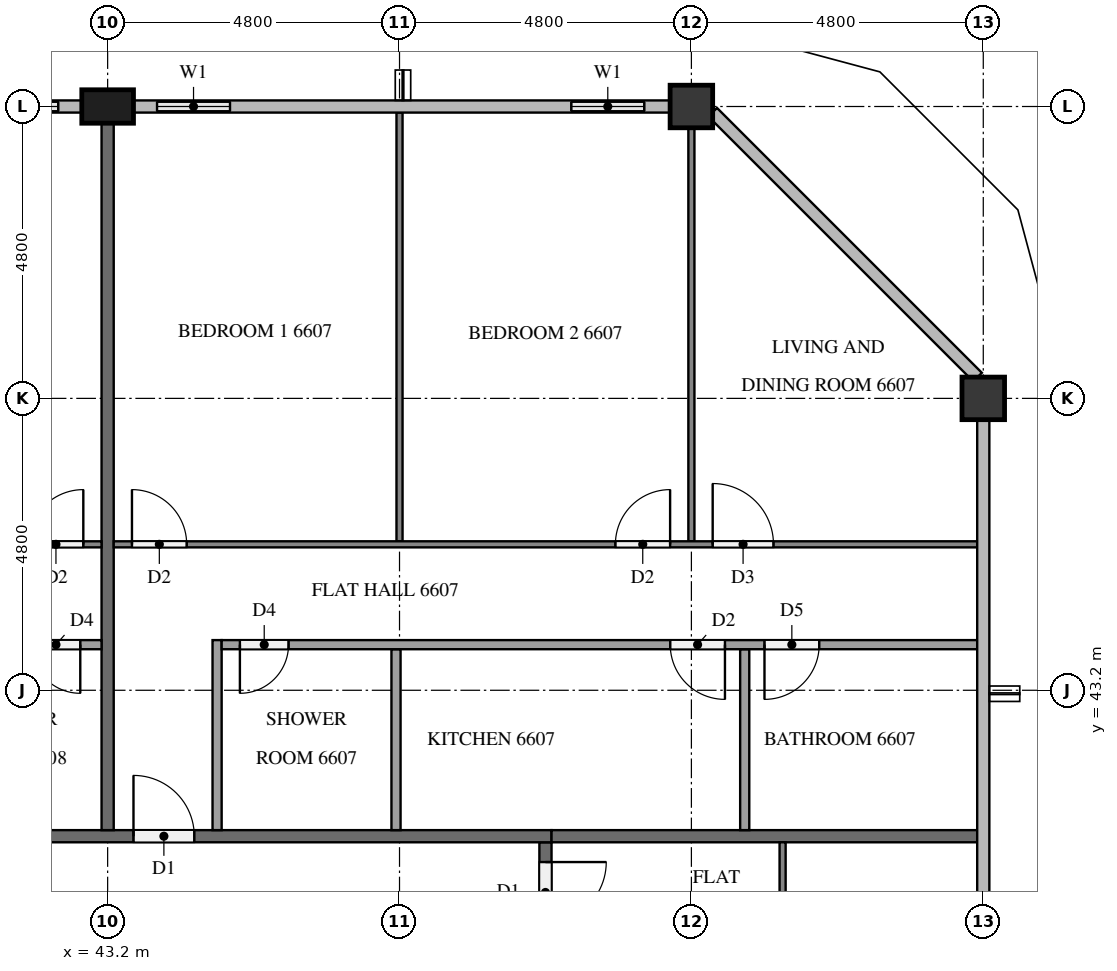
"""IFC4 building model, lengths in metres.
Left out: names, types, materials, properties, quantities, classifications, styles, units other than length and angle.
Written with IfcOpenShell. Run it as: python <this file> out.ifc"""

import sys

from ifc_helpers import new_model, si_unit, direction, frame, frame_2d, origin, origin_2d, place, context, subcontext, project, spatial, rectangle, extrude, element, fill, save


model = new_model("IFC4")
c1 = context("Model", 3, precision=1e-05, world=origin(), true_north=direction((0.0, 1.0)))
c2 = subcontext(c1, "Body", "Model", "MODEL_VIEW")
j1 = project(units=[si_unit("LENGTHUNIT", "METRE"), si_unit("PLANEANGLEUNIT", "RADIAN")], contexts=[c1])
p1 = place(None, origin())
s1 = spatial("IfcSite", under=j1, at=p1, CompositionType="ELEMENT")
p2 = place(p1, origin())
s2 = spatial("IfcBuilding", under=s1, at=p2, CompositionType="ELEMENT")
p3 = place(p2, frame((0.0, 0.0, 252.7)))
s3 = spatial("IfcBuildingStorey", under=s2, at=p3, CompositionType="ELEMENT", Elevation=252.7)
for number, where, z_axis, x_axis in (
    (1, (57.6, 48.0, 0.0), (0.0, 0.0, 1.0), (1.0, 0.0, 0.0)),
    (2, (52.8, 52.8, 0.0), (0.0, 0.0, 1.0), (1.0, 0.0, 0.0)),
):
    element("IfcColumn", number, at=place(p3, frame(where, z_axis=z_axis, x_axis=x_axis)), inside=s3, PredefinedType="COLUMN", context=c2, shape_type="SweptSolid", body=[
        extrude(rectangle(XDim=0.7, YDim=0.7, at=origin_2d()), origin(), (0.0, 0.0, 1.0), 3.2),
    ])
p4 = place(p3, frame((43.2, 52.8, 0.0), z_axis=(0.0, 0.0, 1.0), x_axis=(1.0, 0.0, 0.0)))
e3 = element("IfcColumn", 3, at=p4, inside=s3, PredefinedType="COLUMN", context=c2, shape_type="SweptSolid", body=[
    extrude(rectangle(XDim=0.85, YDim=0.55, at=origin_2d()), origin(), (0.0, 0.0, 1.0), 3.2),
])
p5 = place(p3, frame((52.45, 52.8, 0.0), z_axis=(0.0, 0.0, 1.0), x_axis=(-1.0, 0.0, 0.0)))
e4 = element("IfcWall", 4, at=p5, inside=s3, PredefinedType="SOLIDWALL", context=c2, shape_type="SweptSolid", body=[
    extrude(rectangle(XDim=2.05, YDim=0.15, at=frame_2d((1.025, 0.0))), origin(), (0.0, 0.0, 1.0), 3.2),
])
p6 = place(p5, frame((0.425, 0.0, 0.9)))
e5 = element("IfcOpeningElement", 5, at=p6, cuts=e4, PredefinedType="OPENING", context=c2, shape_type="SweptSolid", body=[
    extrude(rectangle(XDim=1.2, YDim=1.4, at=frame_2d((0.6, 0.7))), frame((0.0, 0.085, 0.0), z_axis=(0.0, -1.0, 0.0), x_axis=(1.0, 0.0, 0.0)), (0.0, 0.0, 1.0), 0.17),
])
p7 = place(p3, frame((45.6, 52.8, 0.0), z_axis=(0.0, 0.0, 1.0), x_axis=(-1.0, 0.0, 0.0)))
e6 = element("IfcWall", 6, at=p7, inside=s3, PredefinedType="SOLIDWALL", context=c2, shape_type="SweptSolid", body=[
    extrude(rectangle(XDim=1.975, YDim=0.15, at=frame_2d((0.988, 0.0))), origin(), (0.0, 0.0, 1.0), 3.2),
])
p8 = place(p7, frame((0.387, 0.0, 0.9)))
e7 = element("IfcOpeningElement", 7, at=p8, cuts=e6, PredefinedType="OPENING", context=c2, shape_type="SweptSolid", body=[
    extrude(rectangle(XDim=1.2, YDim=1.4, at=frame_2d((0.6, 0.7))), frame((0.0, 0.085, 0.0), z_axis=(0.0, -1.0, 0.0), x_axis=(1.0, 0.0, 0.0)), (0.0, 0.0, 1.0), 0.17),
])
p9 = place(p3, frame((42.775, 52.8, 0.0), z_axis=(0.0, 0.0, 1.0), x_axis=(-1.0, 0.0, 0.0)))
e8 = element("IfcWall", 8, at=p9, inside=s3, PredefinedType="SOLIDWALL", context=c2, shape_type="SweptSolid", body=[
    extrude(rectangle(XDim=1.975, YDim=0.15, at=frame_2d((0.987, 0.0))), origin(), (0.0, 0.0, 1.0), 3.2),
])
p10 = place(p9, frame((0.387, 0.0, 0.9)))
e9 = element("IfcOpeningElement", 9, at=p10, cuts=e8, PredefinedType="OPENING", context=c2, shape_type="SweptSolid", body=[
    extrude(rectangle(XDim=1.2, YDim=1.4, at=frame_2d((0.6, 0.7))), frame((0.0, 0.085, 0.0), z_axis=(0.0, -1.0, 0.0), x_axis=(1.0, 0.0, 0.0)), (0.0, 0.0, 1.0), 0.17),
])
p11 = place(p3, frame((50.4, 40.7, 0.0), z_axis=(0.0, 0.0, 1.0), x_axis=(0.0, -1.0, 0.0)))
e10 = element("IfcWall", 10, at=p11, inside=s3, PredefinedType="PARTITIONING", context=c2, shape_type="SweptSolid", body=[
    extrude(rectangle(XDim=28.6, YDim=0.2, at=frame_2d((14.3, 0.0))), origin(), (0.0, 0.0, 1.0), 3.2),
])
p12 = place(p11, frame((19.525, 0.0, 0.0)))
e11 = element("IfcOpeningElement", 11, at=p12, cuts=e10, PredefinedType="OPENING", context=c2, shape_type="SweptSolid", body=[
    extrude(rectangle(XDim=1.0, YDim=2.1, at=frame_2d((0.5, 1.05))), frame((0.0, 0.11, 0.0), z_axis=(0.0, -1.0, 0.0), x_axis=(1.0, 0.0, 0.0)), (0.0, 0.0, 1.0), 0.22),
])
p13 = place(p11, frame((17.675, 0.0, 0.0)))
e12 = element("IfcOpeningElement", 12, at=p13, cuts=e10, PredefinedType="OPENING", context=c2, shape_type="SweptSolid", body=[
    extrude(rectangle(XDim=1.0, YDim=2.1, at=frame_2d((0.5, 1.05))), frame((0.0, 0.11, 0.0), z_axis=(0.0, -1.0, 0.0), x_axis=(1.0, 0.0, 0.0)), (0.0, 0.0, 1.0), 0.22),
])
p14 = place(p11, frame((0.325, 0.0, 0.0)))
e13 = element("IfcOpeningElement", 13, at=p14, cuts=e10, PredefinedType="OPENING", context=c2, shape_type="SweptSolid", body=[
    extrude(rectangle(XDim=1.0, YDim=2.1, at=frame_2d((0.5, 1.05))), frame((0.0, 0.11, 0.0), z_axis=(0.0, -1.0, 0.0), x_axis=(1.0, 0.0, 0.0)), (0.0, 0.0, 1.0), 0.22),
])
p15 = place(p3, frame((11.9, 40.8, 0.0), z_axis=(0.0, 0.0, 1.0), x_axis=(1.0, 0.0, 0.0)))
e14 = element("IfcWall", 14, at=p15, inside=s3, PredefinedType="PARTITIONING", context=c2, shape_type="SweptSolid", body=[
    extrude(rectangle(XDim=38.6, YDim=0.2, at=frame_2d((19.3, 0.0))), origin(), (0.0, 0.0, 1.0), 3.2),
])
p16 = place(p15, frame((31.725, 0.0, 0.0)))
e15 = element("IfcOpeningElement", 15, at=p16, cuts=e14, PredefinedType="OPENING", context=c2, shape_type="SweptSolid", body=[
    extrude(rectangle(XDim=1.0, YDim=2.1, at=frame_2d((0.5, 1.05))), frame((0.0, 0.11, 0.0), z_axis=(0.0, -1.0, 0.0), x_axis=(1.0, 0.0, 0.0)), (0.0, 0.0, 1.0), 0.22),
])
p17 = place(p15, frame((17.325, 0.0, 0.0)))
e16 = element("IfcOpeningElement", 16, at=p17, cuts=e14, PredefinedType="OPENING", context=c2, shape_type="SweptSolid", body=[
    extrude(rectangle(XDim=1.0, YDim=2.1, at=frame_2d((0.5, 1.05))), frame((0.0, 0.11, 0.0), z_axis=(0.0, -1.0, 0.0), x_axis=(1.0, 0.0, 0.0)), (0.0, 0.0, 1.0), 0.22),
])
p18 = place(p15, frame((0.525, 0.0, 0.0)))
e17 = element("IfcOpeningElement", 17, at=p18, cuts=e14, PredefinedType="OPENING", context=c2, shape_type="SweptSolid", body=[
    extrude(rectangle(XDim=1.0, YDim=2.1, at=frame_2d((0.5, 1.05))), frame((0.0, 0.11, 0.0), z_axis=(0.0, -1.0, 0.0), x_axis=(1.0, 0.0, 0.0)), (0.0, 0.0, 1.0), 0.22),
])
p19 = place(p3, frame((50.5, 40.8, 0.0), z_axis=(0.0, 0.0, 1.0), x_axis=(1.0, 0.0, 0.0)))
e18 = element("IfcWall", 18, at=p19, inside=s3, PredefinedType="PARTITIONING", context=c2, shape_type="SweptSolid", body=[
    extrude(rectangle(XDim=7.0, YDim=0.2, at=frame_2d((3.5, 0.0))), origin(), (0.0, 0.0, 1.0), 3.2),
])
p20 = place(p3, frame((43.2, 52.525, 0.0), z_axis=(0.0, 0.0, 1.0), x_axis=(0.0, -1.0, 0.0)))
e19 = element("IfcWall", 19, at=p20, inside=s3, PredefinedType="PARTITIONING", context=c2, shape_type="SweptSolid", body=[
    extrude(rectangle(XDim=11.625, YDim=0.2, at=frame_2d((5.812, 0.0))), origin(), (0.0, 0.0, 1.0), 3.2),
])
p21 = place(p3, frame((54.3, 40.7, 0.0), z_axis=(0.0, 0.0, 1.0), x_axis=(0.0, -1.0, 0.0)))
e20 = element("IfcWall", 20, at=p21, inside=s3, PredefinedType="PARTITIONING", context=c2, shape_type="SweptSolid", body=[
    extrude(rectangle(XDim=9.4, YDim=0.1, at=frame_2d((4.7, 0.0))), origin(), (0.0, 0.0, 1.0), 3.2),
])
p22 = place(p21, frame((3.45, 0.0, 0.0)))
e21 = element("IfcOpeningElement", 21, at=p22, cuts=e20, PredefinedType="OPENING", context=c2, shape_type="SweptSolid", body=[
    extrude(rectangle(XDim=0.9, YDim=2.1, at=frame_2d((0.45, 1.05))), frame((0.0, 0.06, 0.0), z_axis=(0.0, -1.0, 0.0), x_axis=(1.0, 0.0, 0.0)), (0.0, 0.0, 1.0), 0.12),
])
p23 = place(p21, frame((5.05, 0.0, 0.0)))
e22 = element("IfcOpeningElement", 22, at=p23, cuts=e20, PredefinedType="OPENING", context=c2, shape_type="SweptSolid", body=[
    extrude(rectangle(XDim=1.0, YDim=2.1, at=frame_2d((0.5, 1.05))), frame((0.0, 0.06, 0.0), z_axis=(0.0, -1.0, 0.0), x_axis=(1.0, 0.0, 0.0)), (0.0, 0.0, 1.0), 0.12),
])
p24 = place(p3, frame((48.0, 45.65, 0.0), z_axis=(0.0, 0.0, 1.0), x_axis=(0.0, 1.0, 0.0)))
e23 = element("IfcWall", 23, at=p24, inside=s3, PredefinedType="PARTITIONING", context=c2, shape_type="SweptSolid", body=[
    extrude(rectangle(XDim=7.05, YDim=0.1, at=frame_2d((3.525, 0.0))), origin(), (0.0, 0.0, 1.0), 3.2),
])
p25 = place(p3, frame((52.8, 45.65, 0.0), z_axis=(0.0, 0.0, 1.0), x_axis=(0.0, 1.0, 0.0)))
e24 = element("IfcWall", 24, at=p25, inside=s3, PredefinedType="PARTITIONING", context=c2, shape_type="SweptSolid", body=[
    extrude(rectangle(XDim=6.8, YDim=0.1, at=frame_2d((3.4, 0.0))), origin(), (0.0, 0.0, 1.0), 3.2),
])
p26 = place(p3, frame((43.3, 45.6, 0.0), z_axis=(0.0, 0.0, 1.0), x_axis=(1.0, 0.0, 0.0)))
e25 = element("IfcWall", 25, at=p26, inside=s3, PredefinedType="PARTITIONING", context=c2, shape_type="SweptSolid", body=[
    extrude(rectangle(XDim=14.2, YDim=0.1, at=frame_2d((7.1, 0.0))), origin(), (0.0, 0.0, 1.0), 3.2),
])
p27 = place(p26, frame((0.3, 0.0, 0.0)))
e26 = element("IfcOpeningElement", 26, at=p27, cuts=e25, PredefinedType="OPENING", context=c2, shape_type="SweptSolid", body=[
    extrude(rectangle(XDim=0.9, YDim=2.1, at=frame_2d((0.45, 1.05))), frame((0.0, 0.06, 0.0), z_axis=(0.0, -1.0, 0.0), x_axis=(1.0, 0.0, 0.0)), (0.0, 0.0, 1.0), 0.12),
])
p28 = place(p26, frame((8.25, 0.0, 0.0)))
e27 = element("IfcOpeningElement", 27, at=p28, cuts=e25, PredefinedType="OPENING", context=c2, shape_type="SweptSolid", body=[
    extrude(rectangle(XDim=0.9, YDim=2.1, at=frame_2d((0.45, 1.05))), frame((0.0, 0.06, 0.0), z_axis=(0.0, -1.0, 0.0), x_axis=(1.0, 0.0, 0.0)), (0.0, 0.0, 1.0), 0.12),
])
p29 = place(p26, frame((9.85, 0.0, 0.0)))
e28 = element("IfcOpeningElement", 28, at=p29, cuts=e25, PredefinedType="OPENING", context=c2, shape_type="SweptSolid", body=[
    extrude(rectangle(XDim=1.0, YDim=2.1, at=frame_2d((0.5, 1.05))), frame((0.0, 0.06, 0.0), z_axis=(0.0, -1.0, 0.0), x_axis=(1.0, 0.0, 0.0)), (0.0, 0.0, 1.0), 0.12),
])
for number, where, z_axis, x_axis in (
    (29, (47.942, 40.9, 0.0), (0.0, 0.0, 1.0), (0.0, 1.0, 0.0)),
    (30, (53.677, 40.9, 0.0), (0.0, 0.0, 1.0), (0.0, 1.0, 0.0)),
):
    element("IfcWall", number, at=place(p3, frame(where, z_axis=z_axis, x_axis=x_axis)), inside=s3, PredefinedType="PARTITIONING", context=c2, shape_type="SweptSolid", body=[
        extrude(rectangle(XDim=2.975, YDim=0.15, at=frame_2d((1.488, 0.0))), origin(), (0.0, 0.0, 1.0), 3.2),
    ])
p30 = place(p3, frame((45.0, 40.9, 0.0), z_axis=(0.0, 0.0, 1.0), x_axis=(0.0, 1.0, 0.0)))
e31 = element("IfcWall", 31, at=p30, inside=s3, PredefinedType="PARTITIONING", context=c2, shape_type="SweptSolid", body=[
    extrude(rectangle(XDim=3.125, YDim=0.15, at=frame_2d((1.562, 0.0))), origin(), (0.0, 0.0, 1.0), 3.2),
])
p31 = place(p3, frame((57.5, 43.95, 0.0), z_axis=(0.0, 0.0, 1.0), x_axis=(-1.0, 0.0, 0.0)))
e32 = element("IfcWall", 32, at=p31, inside=s3, PredefinedType="PARTITIONING", context=c2, shape_type="SweptSolid", body=[
    extrude(rectangle(XDim=12.425, YDim=0.15, at=frame_2d((6.212, 0.0))), origin(), (0.0, 0.0, 1.0), 3.2),
])
p32 = place(p31, frame((11.325, 0.0, 0.0)))
e33 = element("IfcOpeningElement", 33, at=p32, cuts=e32, PredefinedType="OPENING", context=c2, shape_type="SweptSolid", body=[
    extrude(rectangle(XDim=0.8, YDim=2.1, at=frame_2d((0.4, 1.05))), frame((0.0, 0.085, 0.0), z_axis=(0.0, -1.0, 0.0), x_axis=(1.0, 0.0, 0.0)), (0.0, 0.0, 1.0), 0.17),
])
p33 = place(p31, frame((4.148, 0.0, 0.0)))
e34 = element("IfcOpeningElement", 34, at=p33, cuts=e32, PredefinedType="OPENING", context=c2, shape_type="SweptSolid", body=[
    extrude(rectangle(XDim=0.9, YDim=2.1, at=frame_2d((0.45, 1.05))), frame((0.0, 0.085, 0.0), z_axis=(0.0, -1.0, 0.0), x_axis=(1.0, 0.0, 0.0)), (0.0, 0.0, 1.0), 0.17),
])
p34 = place(p31, frame((2.598, 0.0, 0.0)))
e35 = element("IfcOpeningElement", 35, at=p34, cuts=e32, PredefinedType="OPENING", context=c2, shape_type="SweptSolid", body=[
    extrude(rectangle(XDim=0.9, YDim=2.1, at=frame_2d((0.45, 1.05))), frame((0.0, 0.085, 0.0), z_axis=(0.0, -1.0, 0.0), x_axis=(1.0, 0.0, 0.0)), (0.0, 0.0, 1.0), 0.17),
])
p35 = place(p3, frame((28.9, 45.6, 0.0), z_axis=(0.0, 0.0, 1.0), x_axis=(1.0, 0.0, 0.0)))
e36 = element("IfcWall", 36, at=p35, inside=s3, PredefinedType="PARTITIONING", context=c2, shape_type="SweptSolid", body=[
    extrude(rectangle(XDim=14.2, YDim=0.1, at=frame_2d((7.1, 0.0))), origin(), (0.0, 0.0, 1.0), 3.2),
])
p36 = place(p35, frame((3.35, 0.0, 0.0)))
e37 = element("IfcOpeningElement", 37, at=p36, cuts=e36, PredefinedType="OPENING", context=c2, shape_type="SweptSolid", body=[
    extrude(rectangle(XDim=1.0, YDim=2.1, at=frame_2d((0.5, 1.05))), frame((0.0, 0.06, 0.0), z_axis=(0.0, -1.0, 0.0), x_axis=(1.0, 0.0, 0.0)), (0.0, 0.0, 1.0), 0.12),
])
p37 = place(p35, frame((5.05, 0.0, 0.0)))
e38 = element("IfcOpeningElement", 38, at=p37, cuts=e36, PredefinedType="OPENING", context=c2, shape_type="SweptSolid", body=[
    extrude(rectangle(XDim=0.9, YDim=2.1, at=frame_2d((0.45, 1.05))), frame((0.0, 0.06, 0.0), z_axis=(0.0, -1.0, 0.0), x_axis=(1.0, 0.0, 0.0)), (0.0, 0.0, 1.0), 0.12),
])
p38 = place(p35, frame((13.0, 0.0, 0.0)))
e39 = element("IfcOpeningElement", 39, at=p38, cuts=e36, PredefinedType="OPENING", context=c2, shape_type="SweptSolid", body=[
    extrude(rectangle(XDim=0.9, YDim=2.1, at=frame_2d((0.45, 1.05))), frame((0.0, 0.06, 0.0), z_axis=(0.0, -1.0, 0.0), x_axis=(1.0, 0.0, 0.0)), (0.0, 0.0, 1.0), 0.12),
])
p39 = place(p3, frame((43.1, 43.95, 0.0), z_axis=(0.0, 0.0, 1.0), x_axis=(-1.0, 0.0, 0.0)))
e40 = element("IfcWall", 40, at=p39, inside=s3, PredefinedType="PARTITIONING", context=c2, shape_type="SweptSolid", body=[
    extrude(rectangle(XDim=12.425, YDim=0.15, at=frame_2d((6.212, 0.0))), origin(), (0.0, 0.0, 1.0), 3.2),
])
p40 = place(p39, frame((7.015, 0.0, 0.0)))
e41 = element("IfcOpeningElement", 41, at=p40, cuts=e40, PredefinedType="OPENING", context=c2, shape_type="SweptSolid", body=[
    extrude(rectangle(XDim=0.9, YDim=2.1, at=frame_2d((0.45, 1.05))), frame((0.0, 0.085, 0.0), z_axis=(0.0, -1.0, 0.0), x_axis=(1.0, 0.0, 0.0)), (0.0, 0.0, 1.0), 0.17),
])
p41 = place(p39, frame((5.465, 0.0, 0.0)))
e42 = element("IfcOpeningElement", 42, at=p41, cuts=e40, PredefinedType="OPENING", context=c2, shape_type="SweptSolid", body=[
    extrude(rectangle(XDim=0.9, YDim=2.1, at=frame_2d((0.45, 1.05))), frame((0.0, 0.085, 0.0), z_axis=(0.0, -1.0, 0.0), x_axis=(1.0, 0.0, 0.0)), (0.0, 0.0, 1.0), 0.17),
])
p42 = place(p39, frame((0.35, 0.0, 0.0)))
e43 = element("IfcOpeningElement", 43, at=p42, cuts=e40, PredefinedType="OPENING", context=c2, shape_type="SweptSolid", body=[
    extrude(rectangle(XDim=0.8, YDim=2.1, at=frame_2d((0.4, 1.05))), frame((0.0, 0.085, 0.0), z_axis=(0.0, -1.0, 0.0), x_axis=(1.0, 0.0, 0.0)), (0.0, 0.0, 1.0), 0.17),
])
p43 = place(p6, origin())
e44 = element("IfcWindow", 44, at=p43, inside=s3, PartitioningType="SINGLE_PANEL", PredefinedType="WINDOW", context=c2, shape_type="SweptSolid", body=[
    extrude(rectangle(XDim=1.2, YDim=1.4, at=frame_2d((0.6, 0.7))), frame((0.0, 0.03, 0.0), z_axis=(0.0, -1.0, 0.0), x_axis=(1.0, 0.0, 0.0)), (0.0, 0.0, 1.0), 0.06),
])
fill(e5, e44)
p44 = place(p8, origin())
e45 = element("IfcWindow", 45, at=p44, inside=s3, PartitioningType="SINGLE_PANEL", PredefinedType="WINDOW", context=c2, shape_type="SweptSolid", body=[
    extrude(rectangle(XDim=1.2, YDim=1.4, at=frame_2d((0.6, 0.7))), frame((0.0, 0.03, 0.0), z_axis=(0.0, -1.0, 0.0), x_axis=(1.0, 0.0, 0.0)), (0.0, 0.0, 1.0), 0.06),
])
fill(e7, e45)
p45 = place(p10, origin())
e46 = element("IfcWindow", 46, at=p45, inside=s3, PartitioningType="SINGLE_PANEL", PredefinedType="WINDOW", context=c2, shape_type="SweptSolid", body=[
    extrude(rectangle(XDim=1.2, YDim=1.4, at=frame_2d((0.6, 0.7))), frame((0.0, 0.03, 0.0), z_axis=(0.0, -1.0, 0.0), x_axis=(1.0, 0.0, 0.0)), (0.0, 0.0, 1.0), 0.06),
])
fill(e9, e46)
p46 = place(p14, origin())
e47 = element("IfcDoor", 47, at=p46, inside=s3, OperationType="SINGLE_SWING_LEFT", PredefinedType="DOOR", context=c2, shape_type="SweptSolid", body=[
    extrude(rectangle(XDim=1.0, YDim=2.1, at=frame_2d((0.5, 1.05))), frame((0.0, 0.025, 0.0), z_axis=(0.0, -1.0, 0.0), x_axis=(1.0, 0.0, 0.0)), (0.0, 0.0, 1.0), 0.05),
])
fill(e13, e47)
p47 = place(p16, origin())
e48 = element("IfcDoor", 48, at=p47, inside=s3, OperationType="SINGLE_SWING_LEFT", PredefinedType="DOOR", context=c2, shape_type="SweptSolid", body=[
    extrude(rectangle(XDim=1.0, YDim=2.1, at=frame_2d((0.5, 1.05))), frame((0.0, 0.025, 0.0), z_axis=(0.0, -1.0, 0.0), x_axis=(1.0, 0.0, 0.0)), (0.0, 0.0, 1.0), 0.05),
])
fill(e15, e48)
p48 = place(p27, origin())
e49 = element("IfcDoor", 49, at=p48, inside=s3, OperationType="SINGLE_SWING_LEFT", PredefinedType="DOOR", context=c2, shape_type="SweptSolid", body=[
    extrude(rectangle(XDim=0.9, YDim=2.1, at=frame_2d((0.45, 1.05))), frame((0.0, 0.025, 0.0), z_axis=(0.0, -1.0, 0.0), x_axis=(1.0, 0.0, 0.0)), (0.0, 0.0, 1.0), 0.05),
])
fill(e26, e49)
p49 = place(p28, origin())
e50 = element("IfcDoor", 50, at=p49, inside=s3, OperationType="SINGLE_SWING_RIGHT", PredefinedType="DOOR", context=c2, shape_type="SweptSolid", body=[
    extrude(rectangle(XDim=0.9, YDim=2.1, at=frame_2d((0.45, 1.05))), frame((0.0, 0.025, 0.0), z_axis=(0.0, -1.0, 0.0), x_axis=(1.0, 0.0, 0.0)), (0.0, 0.0, 1.0), 0.05),
])
fill(e27, e50)
p50 = place(p29, origin())
e51 = element("IfcDoor", 51, at=p50, inside=s3, OperationType="SINGLE_SWING_LEFT", PredefinedType="DOOR", context=c2, shape_type="SweptSolid", body=[
    extrude(rectangle(XDim=1.0, YDim=2.1, at=frame_2d((0.5, 1.05))), frame((0.0, 0.025, 0.0), z_axis=(0.0, -1.0, 0.0), x_axis=(1.0, 0.0, 0.0)), (0.0, 0.0, 1.0), 0.05),
])
fill(e28, e51)
p51 = place(p32, origin())
e52 = element("IfcDoor", 52, at=p51, inside=s3, OperationType="SINGLE_SWING_RIGHT", PredefinedType="DOOR", context=c2, shape_type="SweptSolid", body=[
    extrude(rectangle(XDim=0.8, YDim=2.1, at=frame_2d((0.4, 1.05))), frame((0.0, 0.025, 0.0), z_axis=(0.0, -1.0, 0.0), x_axis=(1.0, 0.0, 0.0)), (0.0, 0.0, 1.0), 0.05),
])
fill(e33, e52)
p52 = place(p33, origin())
e53 = element("IfcDoor", 53, at=p52, inside=s3, OperationType="SINGLE_SWING_LEFT", PredefinedType="DOOR", context=c2, shape_type="SweptSolid", body=[
    extrude(rectangle(XDim=0.9, YDim=2.1, at=frame_2d((0.45, 1.05))), frame((0.0, 0.025, 0.0), z_axis=(0.0, -1.0, 0.0), x_axis=(1.0, 0.0, 0.0)), (0.0, 0.0, 1.0), 0.05),
])
fill(e34, e53)
p53 = place(p34, origin())
e54 = element("IfcDoor", 54, at=p53, inside=s3, OperationType="SINGLE_SWING_RIGHT", PredefinedType="DOOR", context=c2, shape_type="SweptSolid", body=[
    extrude(rectangle(XDim=0.9, YDim=2.1, at=frame_2d((0.45, 1.05))), frame((0.0, 0.025, 0.0), z_axis=(0.0, -1.0, 0.0), x_axis=(1.0, 0.0, 0.0)), (0.0, 0.0, 1.0), 0.05),
])
fill(e35, e54)
p54 = place(p38, origin())
e55 = element("IfcDoor", 55, at=p54, inside=s3, OperationType="SINGLE_SWING_RIGHT", PredefinedType="DOOR", context=c2, shape_type="SweptSolid", body=[
    extrude(rectangle(XDim=0.9, YDim=2.1, at=frame_2d((0.45, 1.05))), frame((0.0, 0.025, 0.0), z_axis=(0.0, -1.0, 0.0), x_axis=(1.0, 0.0, 0.0)), (0.0, 0.0, 1.0), 0.05),
])
fill(e39, e55)
p55 = place(p42, origin())
e56 = element("IfcDoor", 56, at=p55, inside=s3, OperationType="SINGLE_SWING_LEFT", PredefinedType="DOOR", context=c2, shape_type="SweptSolid", body=[
    extrude(rectangle(XDim=0.8, YDim=2.1, at=frame_2d((0.4, 1.05))), frame((0.0, 0.025, 0.0), z_axis=(0.0, -1.0, 0.0), x_axis=(1.0, 0.0, 0.0)), (0.0, 0.0, 1.0), 0.05),
])
fill(e43, e56)
save(model, sys.argv[1])
